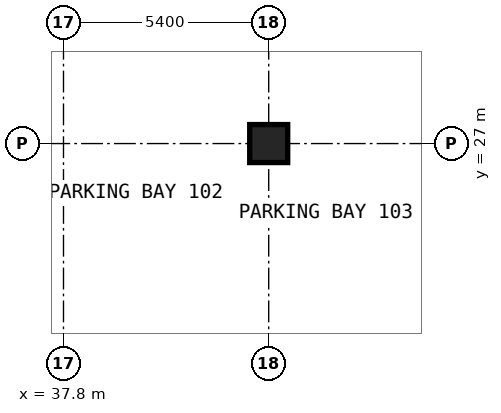
"""IFC4 building model, lengths in metres.
Left out: names, types, materials, properties, quantities, classifications, styles, units other than length and angle.
Written with IfcOpenShell. Run it as: python <this file> out.ifc"""

import sys

from ifc_helpers import new_model, si_unit, direction, frame, origin, origin_2d, place, context, subcontext, project, spatial, rectangle, extrude, element, save


model = new_model("IFC4")
c1 = context("Model", 3, precision=1e-05, world=origin(), true_north=direction((0.0, 1.0)))
c2 = subcontext(c1, "Body", "Model", "MODEL_VIEW")
j1 = project(units=[si_unit("LENGTHUNIT", "METRE"), si_unit("PLANEANGLEUNIT", "RADIAN")], contexts=[c1])
p1 = place(None, origin())
s1 = spatial("IfcSite", under=j1, at=p1, CompositionType="ELEMENT")
p2 = place(p1, origin())
s2 = spatial("IfcBuilding", under=s1, at=p2, CompositionType="ELEMENT")
p3 = place(p2, frame((0.0, 0.0, -4.2)))
s3 = spatial("IfcBuildingStorey", under=s2, at=p3, CompositionType="ELEMENT", Elevation=-4.2)
p4 = place(p3, frame((43.2, 27.0, 0.0), z_axis=(0.0, 0.0, 1.0), x_axis=(1.0, 0.0, 0.0)))
e1 = element("IfcColumn", 1, at=p4, inside=s3, PredefinedType="COLUMN", context=c2, shape_type="SweptSolid", body=[
    extrude(rectangle(XDim=1.0, YDim=1.0, at=origin_2d()), origin(), (0.0, 0.0, 1.0), 4.2),
])
save(model, sys.argv[1])
